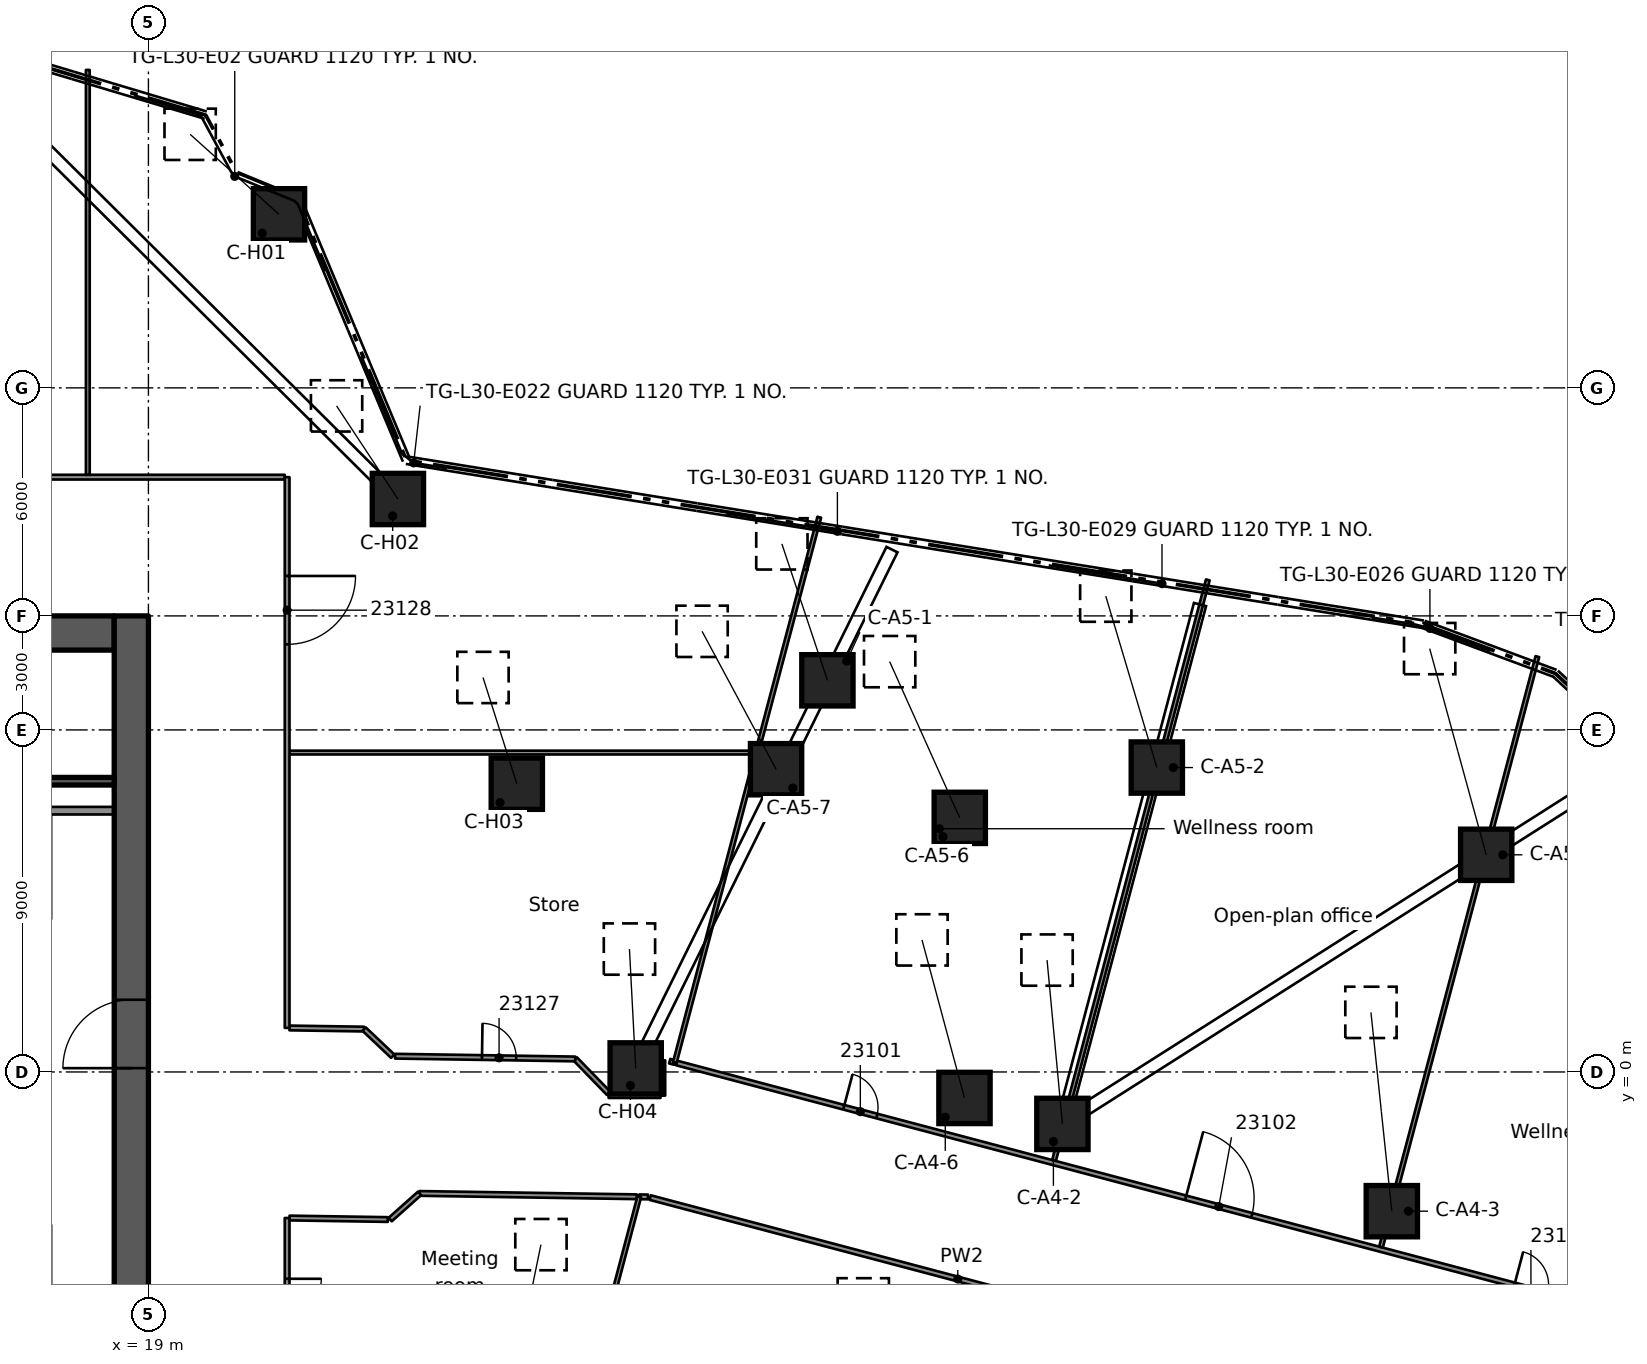
"""IFC4 building model, lengths in metres.
Left out: names, types, materials, properties, quantities, classifications, styles, units other than length and angle.
Written with IfcOpenShell. Run it as: python <this file> out.ifc"""

import sys

from ifc_helpers import new_model, si_unit, direction, frame, frame_2d, origin, origin_2d, place, context, subcontext, project, spatial, rectangle, extrude, element, fill, save


model = new_model("IFC4")
c1 = context("Model", 3, precision=1e-05, world=origin(), true_north=direction((0.0, 1.0)))
c2 = subcontext(c1, "Body", "Model", "MODEL_VIEW")
j1 = project(units=[si_unit("LENGTHUNIT", "METRE"), si_unit("PLANEANGLEUNIT", "RADIAN")], contexts=[c1])
p1 = place(None, origin())
s1 = spatial("IfcSite", under=j1, at=p1, CompositionType="ELEMENT")
p2 = place(p1, origin())
s2 = spatial("IfcBuilding", under=s1, at=p2, CompositionType="ELEMENT")
p3 = place(p2, frame((0.0, 0.0, 119.7)))
s3 = spatial("IfcBuildingStorey", under=s2, at=p3, CompositionType="ELEMENT", Elevation=119.7)
p4 = place(p3, frame((8.9, 11.55, 0.0), z_axis=(0.0, 0.0, 1.0), x_axis=(1.0, 0.0, 0.0)))
e1 = element("IfcWall", 1, at=p4, inside=s3, PredefinedType="SHEAR", context=c2, shape_type="SweptSolid", body=[
    extrude(rectangle(XDim=9.2, YDim=0.9, at=frame_2d((4.6, 0.0))), origin(), (0.0, 0.0, 1.0), 4.0),
])
p5 = place(p4, frame((3.0, 0.0, 0.0)))
e2 = element("IfcOpeningElement", 2, at=p5, cuts=e1, PredefinedType="OPENING", context=c2, shape_type="SweptSolid", body=[
    extrude(rectangle(XDim=1.1, YDim=2.1, at=frame_2d((0.55, 1.05))), frame((0.0, 0.46, 0.0), z_axis=(0.0, -1.0, 0.0), x_axis=(1.0, 0.0, 0.0)), (0.0, 0.0, 1.0), 0.92),
])
p6 = place(p4, frame((0.77, 0.0, 0.0)))
e3 = element("IfcOpeningElement", 3, at=p6, cuts=e1, PredefinedType="OPENING", context=c2, shape_type="SweptSolid", body=[
    extrude(rectangle(XDim=0.9, YDim=2.1, at=frame_2d((0.45, 1.05))), frame((0.0, 0.46, 0.0), z_axis=(0.0, -1.0, 0.0), x_axis=(1.0, 0.0, 0.0)), (0.0, 0.0, 1.0), 0.92),
])
p7 = place(p3, frame((18.55, -12.0, 0.0), z_axis=(0.0, 0.0, 1.0), x_axis=(0.0, 1.0, 0.0)))
e4 = element("IfcWall", 4, at=p7, inside=s3, PredefinedType="SHEAR", context=c2, shape_type="SweptSolid", body=[
    extrude(rectangle(XDim=24.0, YDim=0.9, at=frame_2d((12.0, 0.0))), origin(), (0.0, 0.0, 1.0), 4.0),
])
p8 = place(p7, frame((12.1, 0.0, 0.0)))
e5 = element("IfcOpeningElement", 5, at=p8, cuts=e4, PredefinedType="OPENING", context=c2, shape_type="SweptSolid", body=[
    extrude(rectangle(XDim=1.8, YDim=2.1, at=frame_2d((0.9, 1.05))), frame((0.0, 0.46, 0.0), z_axis=(0.0, -1.0, 0.0), x_axis=(1.0, 0.0, 0.0)), (0.0, 0.0, 1.0), 0.92),
])
p9 = place(p3, frame((43.051, -1.367, 0.562), z_axis=(-0.077735925717, 0.829402402608, 0.553216757159), x_axis=(-0.995636518253, -0.093316255392, 0.0)))
e6 = element("IfcColumn", 6, at=p9, inside=s3, PredefinedType="COLUMN", context=c2, shape_type="SweptSolid", body=[
    extrude(rectangle(XDim=1.35, YDim=1.35, at=origin_2d()), origin(), (0.0, 0.0, 1.0), 5.198),
])
p10 = place(p3, frame((51.719, -3.663, 0.595), z_axis=(-0.092079198253, 0.877270333915, 0.471081927569), x_axis=(-0.994536691035, -0.104387595937, 0.0)))
e7 = element("IfcColumn", 7, at=p10, inside=s3, PredefinedType="COLUMN", context=c2, shape_type="SweptSolid", body=[
    extrude(rectangle(XDim=1.35, YDim=1.35, at=origin_2d()), origin(), (0.0, 0.0, 1.0), 5.963),
])
p11 = place(p3, frame((40.474, -0.684, 0.561), z_axis=(-0.215870876731, 0.802964248031, 0.555561140617), x_axis=(-0.965709833763, -0.259623798934, 0.0)))
e8 = element("IfcColumn", 8, at=p11, inside=s3, PredefinedType="COLUMN", context=c2, shape_type="SweptSolid", body=[
    extrude(rectangle(XDim=1.35, YDim=1.35, at=origin_2d()), origin(), (0.0, 0.0, 1.0), 5.18),
])
p12 = place(p3, frame((36.867, 10.305, 0.533), z_axis=(-0.250197020719, 0.749775257727, 0.61256715038), x_axis=(-0.94858003582, -0.316537384275, 0.0)))
e9 = element("IfcColumn", 9, at=p12, inside=s3, PredefinedType="COLUMN", context=c2, shape_type="SweptSolid", body=[
    extrude(rectangle(XDim=1.35, YDim=1.35, at=origin_2d()), origin(), (0.0, 0.0, 1.0), 4.788),
])
p13 = place(p3, frame((45.535, 8.01, 0.578), z_axis=(-0.244240111636, 0.820186799174, 0.517339716558), x_axis=(-0.958408331569, -0.285400543061, 0.0)))
e10 = element("IfcColumn", 10, at=p13, inside=s3, PredefinedType="COLUMN", context=c2, shape_type="SweptSolid", body=[
    extrude(rectangle(XDim=1.35, YDim=1.35, at=origin_2d()), origin(), (0.0, 0.0, 1.0), 5.499),
])
p14 = place(p3, frame((54.203, 5.714, 0.605), z_axis=(-0.236905885144, 0.86396396315, 0.444344316901), x_axis=(-0.964400394213, -0.264446364396, 0.0)))
e11 = element("IfcColumn", 11, at=p14, inside=s3, PredefinedType="COLUMN", context=c2, shape_type="SweptSolid", body=[
    extrude(rectangle(XDim=1.35, YDim=1.35, at=origin_2d()), origin(), (0.0, 0.0, 1.0), 6.28),
])
p15 = place(p3, frame((40.35, 6.686, 0.57), z_axis=(-0.345725067962, 0.770265205002, 0.535878429633), x_axis=(-0.912317452606, -0.40948365739, 0.0)))
e12 = element("IfcColumn", 12, at=p15, inside=s3, PredefinedType="COLUMN", context=c2, shape_type="SweptSolid", body=[
    extrude(rectangle(XDim=1.35, YDim=1.35, at=origin_2d()), origin(), (0.0, 0.0, 1.0), 5.337),
])
p16 = place(p3, frame((35.516, 7.966, 0.552), z_axis=(-0.386797205622, 0.720728084708, 0.575272934907), x_axis=(-0.881127126302, -0.472879463813, 0.0)))
e13 = element("IfcColumn", 13, at=p16, inside=s3, PredefinedType="COLUMN", context=c2, shape_type="SweptSolid", body=[
    extrude(rectangle(XDim=1.35, YDim=1.35, at=origin_2d()), origin(), (0.0, 0.0, 1.0), 5.034),
])
p17 = place(p3, frame((22.436, 22.567, 0.486), z_axis=(-0.535508605584, 0.48216463464, 0.693359790043), x_axis=(-0.669123341136, -0.743151367049, 0.0)))
e14 = element("IfcColumn", 14, at=p17, inside=s3, PredefinedType="COLUMN", context=c2, shape_type="SweptSolid", body=[
    extrude(rectangle(XDim=1.35, YDim=1.35, at=origin_2d()), origin(), (0.0, 0.0, 1.0), 4.366),
])
p18 = place(p3, frame((25.565, 15.076, 0.467), z_axis=(-0.380287859943, 0.57724832469, 0.722610209742), x_axis=(-0.835072028085, -0.550140625577, 0.0)))
e15 = element("IfcColumn", 15, at=p18, inside=s3, PredefinedType="COLUMN", context=c2, shape_type="SweptSolid", body=[
    extrude(rectangle(XDim=1.35, YDim=1.35, at=origin_2d()), origin(), (0.0, 0.0, 1.0), 4.244),
])
p19 = place(p3, frame((28.694, 7.584, 0.467), z_axis=(-0.20971851237, 0.658720900621, 0.722568280964), x_axis=(-0.95287331329, -0.303368503341, 0.0)))
e16 = element("IfcColumn", 16, at=p19, inside=s3, PredefinedType="COLUMN", context=c2, shape_type="SweptSolid", body=[
    extrude(rectangle(XDim=1.35, YDim=1.35, at=origin_2d()), origin(), (0.0, 0.0, 1.0), 4.244),
])
p20 = place(p3, frame((31.822, 0.093, 0.486), z_axis=(-0.037582399141, 0.719490424028, 0.693484746052), x_axis=(-0.998638551055, -0.052163630494, 0.0)))
e17 = element("IfcColumn", 17, at=p20, inside=s3, PredefinedType="COLUMN", context=c2, shape_type="SweptSolid", body=[
    extrude(rectangle(XDim=1.35, YDim=1.35, at=origin_2d()), origin(), (0.0, 0.0, 1.0), 4.365),
])
p21 = place(p3, frame((28.737, -7.417, 0.467), z_axis=(0.139487809436, 0.677134223786, 0.722518092505), x_axis=(-0.979434804507, 0.201760907316, 0.0)))
e18 = element("IfcColumn", 18, at=p21, inside=s3, PredefinedType="COLUMN", context=c2, shape_type="SweptSolid", body=[
    extrude(rectangle(XDim=1.35, YDim=1.35, at=origin_2d()), origin(), (0.0, 0.0, 1.0), 4.244),
])
for number, where, z_axis, x_axis in (
    (19, (11.54, 6.875, 0.0), (0.0, 0.0, 1.0), (1.0, 0.0, 0.0)),
    (20, (11.54, 7.65, 0.0), (0.0, 0.0, 1.0), (1.0, 0.0, 0.0)),
):
    element("IfcWall", number, at=place(p3, frame(where, z_axis=z_axis, x_axis=x_axis)), inside=s3, PredefinedType="SOLIDWALL", context=c2, shape_type="SweptSolid", body=[
        extrude(rectangle(XDim=6.56, YDim=0.2, at=frame_2d((3.28, 0.0))), origin(), (0.0, 0.0, 1.0), 3.59),
    ])
p22 = place(p3, frame((30.232, 0.342, 0.0), z_axis=(0.0, 0.0, 1.0), x_axis=(0.696242915842, -0.717806242756, 0.0)))
e21 = element("IfcWall", 21, at=p22, inside=s3, PredefinedType="PARTITIONING", context=c2, shape_type="SweptSolid", body=[
    extrude(rectangle(XDim=1.257, YDim=0.125, at=frame_2d((0.628, 0.0))), origin(), (0.0, 0.0, 1.0), 3.58),
])
p23 = place(p3, frame((48.393, -7.592, 0.0), z_axis=(0.0, 0.0, 1.0), x_axis=(-0.966683482387, 0.255974695781, 0.0)))
e22 = element("IfcWall", 22, at=p23, inside=s3, PredefinedType="PARTITIONING", context=c2, shape_type="SweptSolid", body=[
    extrude(rectangle(XDim=16.748, YDim=0.125, at=frame_2d((8.374, 0.0))), origin(), (0.0, 0.0, 1.0), 3.58),
])
p24 = place(p23, frame((2.596, 0.0, 0.0)))
e23 = element("IfcOpeningElement", 23, at=p24, cuts=e22, PredefinedType="OPENING", context=c2, shape_type="SweptSolid", body=[
    extrude(rectangle(XDim=1.0, YDim=2.1, at=frame_2d((0.5, 1.05))), frame((0.0, 0.073, 0.0), z_axis=(0.0, -1.0, 0.0), x_axis=(1.0, 0.0, 0.0)), (0.0, 0.0, 1.0), 0.145),
])
p25 = place(p3, frame((32.9, 0.236, 0.0), z_axis=(0.0, 0.0, 1.0), x_axis=(0.966662717932, -0.256053099493, 0.0)))
e24 = element("IfcWall", 24, at=p25, inside=s3, PredefinedType="PARTITIONING", context=c2, shape_type="SweptSolid", body=[
    extrude(rectangle(XDim=24.995, YDim=0.125, at=frame_2d((12.498, 0.0))), origin(), (0.0, 0.0, 1.0), 3.58),
])
p26 = place(p25, frame((4.55, 0.0, 0.0)))
e25 = element("IfcOpeningElement", 25, at=p26, cuts=e24, PredefinedType="OPENING", context=c2, shape_type="SweptSolid", body=[
    extrude(rectangle(XDim=0.9, YDim=2.1, at=frame_2d((0.45, 1.05))), frame((0.0, 0.073, 0.0), z_axis=(0.0, -1.0, 0.0), x_axis=(1.0, 0.0, 0.0)), (0.0, 0.0, 1.0), 0.145),
])
p27 = place(p25, frame((13.857, 0.0, 0.0)))
e26 = element("IfcOpeningElement", 26, at=p27, cuts=e24, PredefinedType="OPENING", context=c2, shape_type="SweptSolid", body=[
    extrude(rectangle(XDim=1.8, YDim=2.1, at=frame_2d((0.9, 1.05))), frame((0.0, 0.073, 0.0), z_axis=(0.0, -1.0, 0.0), x_axis=(1.0, 0.0, 0.0)), (0.0, 0.0, 1.0), 0.145),
])
p28 = place(p25, frame((22.805, 0.0, 0.0)))
e27 = element("IfcOpeningElement", 27, at=p28, cuts=e24, PredefinedType="OPENING", context=c2, shape_type="SweptSolid", body=[
    extrude(rectangle(XDim=0.9, YDim=2.1, at=frame_2d((0.45, 1.05))), frame((0.0, 0.073, 0.0), z_axis=(0.0, -1.0, 0.0), x_axis=(1.0, 0.0, 0.0)), (0.0, 0.0, 1.0), 0.145),
])
p29 = place(p3, frame((32.717, 0.284, 0.0), z_axis=(0.0, 0.0, 1.0), x_axis=(0.968154228268, -0.250354529191, 0.0)))
e28 = element("IfcWall", 28, at=p29, inside=s3, PredefinedType="PARTITIONING", context=c2, shape_type="SweptSolid", body=[
    extrude(rectangle(XDim=0.139, YDim=0.125, at=frame_2d((0.07, 0.0))), origin(), (0.0, 0.0, 1.0), 3.58),
])
p30 = place(p3, frame((31.916, -3.285, 0.0), z_axis=(0.0, 0.0, 1.0), x_axis=(0.99983297052, -0.018276516665, 0.0)))
e29 = element("IfcWall", 29, at=p30, inside=s3, PredefinedType="PARTITIONING", context=c2, shape_type="SweptSolid", body=[
    extrude(rectangle(XDim=0.227, YDim=0.125, at=frame_2d((0.114, 0.0))), origin(), (0.0, 0.0, 1.0), 3.58),
])
p31 = place(p3, frame((22.712, -3.843, 0.0), z_axis=(0.0, 0.0, 1.0), x_axis=(0.99988026701, -0.015474225138, 0.0)))
e30 = element("IfcWall", 30, at=p31, inside=s3, PredefinedType="PARTITIONING", context=c2, shape_type="SweptSolid", body=[
    extrude(rectangle(XDim=2.587, YDim=0.125, at=frame_2d((1.294, 0.0))), origin(), (0.0, 0.0, 1.0), 3.58),
])
p32 = place(p3, frame((26.134, -3.196, 0.0), z_axis=(0.0, 0.0, 1.0), x_axis=(0.999881768757, -0.015376882257, 0.0)))
e31 = element("IfcWall", 31, at=p32, inside=s3, PredefinedType="PARTITIONING", context=c2, shape_type="SweptSolid", body=[
    extrude(rectangle(XDim=5.716, YDim=0.125, at=frame_2d((2.858, 0.0))), origin(), (0.0, 0.0, 1.0), 3.58),
])
p33 = place(p3, frame((25.49, 0.415, 0.0), z_axis=(0.0, 0.0, 1.0), x_axis=(0.999881531584, -0.015392296656, 0.0)))
e32 = element("IfcWall", 32, at=p33, inside=s3, PredefinedType="PARTITIONING", context=c2, shape_type="SweptSolid", body=[
    extrude(rectangle(XDim=4.742, YDim=0.125, at=frame_2d((2.371, 0.0))), origin(), (0.0, 0.0, 1.0), 3.58),
])
p34 = place(p33, frame((2.288, 0.0, 0.0)))
e33 = element("IfcOpeningElement", 33, at=p34, cuts=e32, PredefinedType="OPENING", context=c2, shape_type="SweptSolid", body=[
    extrude(rectangle(XDim=0.9, YDim=2.1, at=frame_2d((0.45, 1.05))), frame((0.0, 0.073, 0.0), z_axis=(0.0, -1.0, 0.0), x_axis=(1.0, 0.0, 0.0)), (0.0, 0.0, 1.0), 0.145),
])
p35 = place(p3, frame((22.712, 1.158, 0.0), z_axis=(0.0, 0.0, 1.0), x_axis=(0.999883143735, -0.015287212763, 0.0)))
e34 = element("IfcWall", 34, at=p35, inside=s3, PredefinedType="PARTITIONING", context=c2, shape_type="SweptSolid", body=[
    extrude(rectangle(XDim=1.964, YDim=0.125, at=frame_2d((0.982, 0.0))), origin(), (0.0, 0.0, 1.0), 3.58),
])
p36 = place(p3, frame((31.11, -0.622, 0.0), z_axis=(0.0, 0.0, 1.0), x_axis=(1.0, 0.0, 0.0)))
e35 = element("IfcWall", 35, at=p36, inside=s3, PredefinedType="PARTITIONING", context=c2, shape_type="SweptSolid", body=[
    extrude(rectangle(XDim=1.364, YDim=0.125, at=frame_2d((0.682, 0.0))), origin(), (0.0, 0.0, 1.0), 3.58),
])
p37 = place(p3, frame((22.712, 8.404, 0.0), z_axis=(0.0, 0.0, 1.0), x_axis=(1.0, 0.0, 0.0)))
e36 = element("IfcWall", 36, at=p37, inside=s3, PredefinedType="PARTITIONING", context=c2, shape_type="SweptSolid", body=[
    extrude(rectangle(XDim=12.235, YDim=0.1, at=frame_2d((6.118, 0.0))), origin(), (0.0, 0.0, 1.0), 3.58),
])
p38 = place(p3, frame((12.311, 15.651, 0.0), z_axis=(0.0, 0.0, 1.0), x_axis=(1.0, 0.0, 0.0)))
e37 = element("IfcWall", 37, at=p38, inside=s3, PredefinedType="PARTITIONING", context=c2, shape_type="SweptSolid", body=[
    extrude(rectangle(XDim=10.276, YDim=0.125, at=frame_2d((5.138, 0.0))), origin(), (0.0, 0.0, 1.0), 3.58),
])
p39 = place(p3, frame((51.434, -4.609, 0.0), z_axis=(0.0, 0.0, 1.0), x_axis=(0.256010706038, 0.966673946268, 0.0)))
e38 = element("IfcWall", 38, at=p39, inside=s3, PredefinedType="PARTITIONING", context=c2, shape_type="SweptSolid", body=[
    extrude(rectangle(XDim=16.073, YDim=0.1, at=frame_2d((8.037, 0.0))), origin(), (0.0, 0.0, 1.0), 3.58),
])
p40 = place(p3, frame((42.831, -2.33, 0.0), z_axis=(0.0, 0.0, 1.0), x_axis=(0.255993185123, 0.966678586279, 0.0)))
e39 = element("IfcWall", 39, at=p40, inside=s3, PredefinedType="PARTITIONING", context=c2, shape_type="SweptSolid", body=[
    extrude(rectangle(XDim=15.805, YDim=0.1, at=frame_2d((7.902, 0.0))), origin(), (0.0, 0.0, 1.0), 3.58),
])
p41 = place(p3, frame((30.383, -9.071, 0.0), z_axis=(0.0, 0.0, 1.0), x_axis=(0.256101072135, 0.966650009492, 0.0)))
e40 = element("IfcWall", 40, at=p41, inside=s3, PredefinedType="PARTITIONING", context=c2, shape_type="SweptSolid", body=[
    extrude(rectangle(XDim=5.986, YDim=0.1, at=frame_2d((2.993, 0.0))), origin(), (0.0, 0.0, 1.0), 3.58),
])
p42 = place(p3, frame((32.852, 0.249, 0.0), z_axis=(0.0, 0.0, 1.0), x_axis=(0.256084696708, 0.966654347796, 0.0)))
e41 = element("IfcWall", 41, at=p42, inside=s3, PredefinedType="PARTITIONING", context=c2, shape_type="SweptSolid", body=[
    extrude(rectangle(XDim=14.843, YDim=0.1, at=frame_2d((7.421, 0.0))), origin(), (0.0, 0.0, 1.0), 3.58),
])
p43 = place(p3, frame((25.361, -3.884, 0.0), z_axis=(0.0, 0.0, 1.0), x_axis=(0.746966573477, 0.664861593196, 0.0)))
e42 = element("IfcWall", 42, at=p43, inside=s3, PredefinedType="PARTITIONING", context=c2, shape_type="SweptSolid", body=[
    extrude(rectangle(XDim=1.035, YDim=0.125, at=frame_2d((0.517, 0.0))), origin(), (0.0, 0.0, 1.0), 3.58),
])
p44 = place(p3, frame((25.428, 0.416, 0.0), z_axis=(0.0, 0.0, 1.0), x_axis=(-0.726175681963, 0.687509184612, 0.0)))
e43 = element("IfcWall", 43, at=p44, inside=s3, PredefinedType="PARTITIONING", context=c2, shape_type="SweptSolid", body=[
    extrude(rectangle(XDim=1.035, YDim=0.125, at=frame_2d((0.518, 0.0))), origin(), (0.0, 0.0, 1.0), 3.58),
])
p45 = place(p3, frame((32.536, -0.622, 0.0), z_axis=(0.0, 0.0, 1.0), x_axis=(0.0, 1.0, 0.0)))
e44 = element("IfcWall", 44, at=p45, inside=s3, PredefinedType="PARTITIONING", context=c2, shape_type="SweptSolid", body=[
    extrude(rectangle(XDim=0.928, YDim=0.125, at=frame_2d((0.464, 0.0))), origin(), (0.0, 0.0, 1.0), 3.58),
])
p46 = place(p3, frame((22.65, -3.842, 0.0), z_axis=(0.0, 0.0, 1.0), x_axis=(0.0, -1.0, 0.0)))
e45 = element("IfcWall", 45, at=p46, inside=s3, PredefinedType="PARTITIONING", context=c2, shape_type="SweptSolid", body=[
    extrude(rectangle(XDim=4.063, YDim=0.125, at=frame_2d((2.031, 0.0))), origin(), (0.0, 0.0, 1.0), 3.58),
])
p47 = place(p46, frame((1.6, 0.0, 0.0)))
e46 = element("IfcOpeningElement", 46, at=p47, cuts=e45, PredefinedType="OPENING", context=c2, shape_type="SweptSolid", body=[
    extrude(rectangle(XDim=0.9, YDim=2.1, at=frame_2d((0.45, 1.05))), frame((0.0, 0.073, 0.0), z_axis=(0.0, -1.0, 0.0), x_axis=(1.0, 0.0, 0.0)), (0.0, 0.0, 1.0), 0.145),
])
p48 = place(p3, frame((22.65, 15.651, 0.0), z_axis=(0.0, 0.0, 1.0), x_axis=(0.0, -1.0, 0.0)))
e47 = element("IfcWall", 47, at=p48, inside=s3, PredefinedType="PARTITIONING", context=c2, shape_type="SweptSolid", body=[
    extrude(rectangle(XDim=14.492, YDim=0.125, at=frame_2d((7.246, 0.0))), origin(), (0.0, 0.0, 1.0), 3.58),
])
p49 = place(p48, frame((2.6, 0.0, 0.0)))
e48 = element("IfcOpeningElement", 48, at=p49, cuts=e47, PredefinedType="OPENING", context=c2, shape_type="SweptSolid", body=[
    extrude(rectangle(XDim=1.8, YDim=2.1, at=frame_2d((0.9, 1.05))), frame((0.0, 0.073, 0.0), z_axis=(0.0, -1.0, 0.0), x_axis=(1.0, 0.0, 0.0)), (0.0, 0.0, 1.0), 0.145),
])
p50 = place(p3, frame((17.405, 15.713, 0.0), z_axis=(0.0, 0.0, 1.0), x_axis=(0.0, 1.0, 0.0)))
e49 = element("IfcWall", 49, at=p50, inside=s3, PredefinedType="PARTITIONING", context=c2, shape_type="SweptSolid", body=[
    extrude(rectangle(XDim=10.653, YDim=0.1, at=frame_2d((5.327, 0.0))), origin(), (0.0, 0.0, 1.0), 3.58),
])
p51 = place(p8, origin())
e50 = element("IfcDoor", 50, at=p51, inside=s3, OperationType="SINGLE_SWING_RIGHT", PredefinedType="DOOR", context=c2, shape_type="SweptSolid", body=[
    extrude(rectangle(XDim=1.8, YDim=2.1, at=frame_2d((0.9, 1.05))), frame((0.0, 0.025, 0.0), z_axis=(0.0, -1.0, 0.0), x_axis=(1.0, 0.0, 0.0)), (0.0, 0.0, 1.0), 0.05),
])
fill(e5, e50)
p52 = place(p26, origin())
e51 = element("IfcDoor", 51, at=p52, inside=s3, OperationType="SINGLE_SWING_LEFT", PredefinedType="DOOR", context=c2, shape_type="SweptSolid", body=[
    extrude(rectangle(XDim=0.9, YDim=2.1, at=frame_2d((0.45, 1.05))), frame((0.0, 0.025, 0.0), z_axis=(0.0, -1.0, 0.0), x_axis=(1.0, 0.0, 0.0)), (0.0, 0.0, 1.0), 0.05),
])
fill(e25, e51)
p53 = place(p27, origin())
e52 = element("IfcDoor", 52, at=p53, inside=s3, OperationType="DOUBLE_DOOR_SINGLE_SWING", PredefinedType="DOOR", context=c2, shape_type="SweptSolid", body=[
    extrude(rectangle(XDim=1.8, YDim=2.1, at=frame_2d((0.9, 1.05))), frame((0.0, 0.025, 0.0), z_axis=(0.0, -1.0, 0.0), x_axis=(1.0, 0.0, 0.0)), (0.0, 0.0, 1.0), 0.05),
])
fill(e26, e52)
p54 = place(p47, origin())
e53 = element("IfcDoor", 53, at=p54, inside=s3, OperationType="SINGLE_SWING_RIGHT", PredefinedType="DOOR", context=c2, shape_type="SweptSolid", body=[
    extrude(rectangle(XDim=0.9, YDim=2.1, at=frame_2d((0.45, 1.05))), frame((0.0, 0.025, 0.0), z_axis=(0.0, -1.0, 0.0), x_axis=(1.0, 0.0, 0.0)), (0.0, 0.0, 1.0), 0.05),
])
fill(e46, e53)
p55 = place(p34, origin())
e54 = element("IfcDoor", 54, at=p55, inside=s3, OperationType="SINGLE_SWING_RIGHT", PredefinedType="DOOR", context=c2, shape_type="SweptSolid", body=[
    extrude(rectangle(XDim=0.9, YDim=2.1, at=frame_2d((0.45, 1.05))), frame((0.0, 0.025, 0.0), z_axis=(0.0, -1.0, 0.0), x_axis=(1.0, 0.0, 0.0)), (0.0, 0.0, 1.0), 0.05),
])
fill(e33, e54)
p56 = place(p49, origin())
e55 = element("IfcDoor", 55, at=p56, inside=s3, OperationType="DOUBLE_DOOR_SINGLE_SWING", PredefinedType="DOOR", context=c2, shape_type="SweptSolid", body=[
    extrude(rectangle(XDim=1.8, YDim=2.1, at=frame_2d((0.9, 1.05))), frame((0.0, 0.025, 0.0), z_axis=(0.0, -1.0, 0.0), x_axis=(1.0, 0.0, 0.0)), (0.0, 0.0, 1.0), 0.05),
])
fill(e48, e55)
save(model, sys.argv[1])
